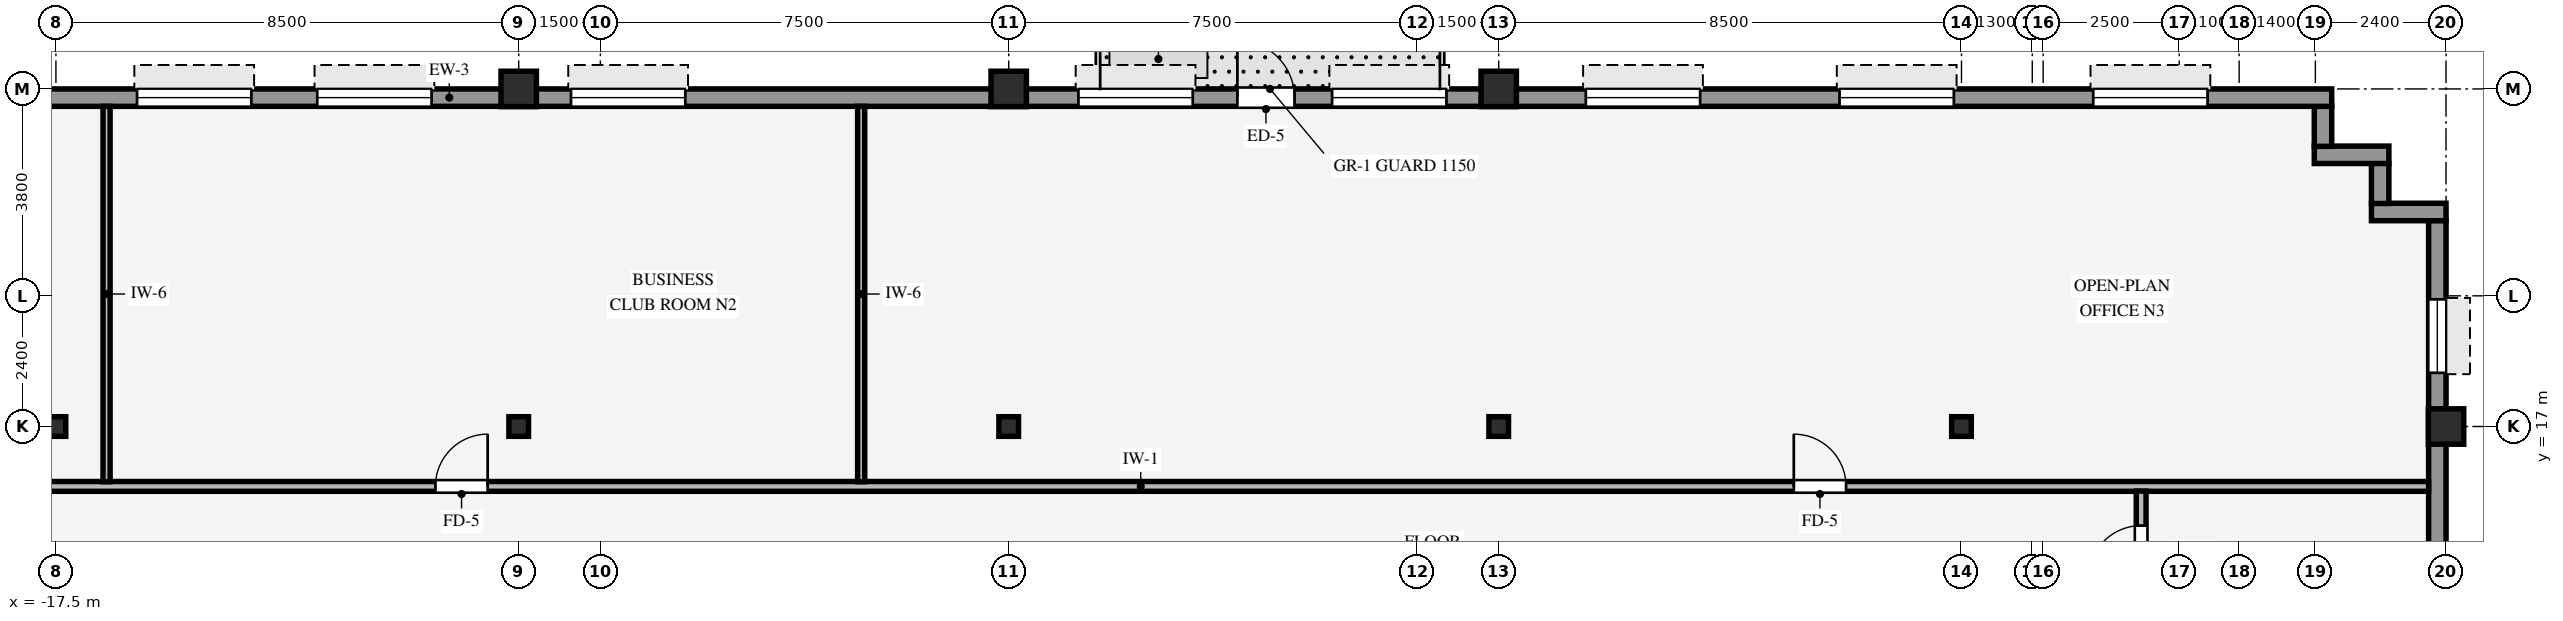
"""IFC4 building model, lengths in metres.
Left out: names, types, materials, properties, quantities, classifications, styles, units other than length and angle.
Written with IfcOpenShell. Run it as: python <this file> out.ifc"""

import sys

from ifc_helpers import new_model, si_unit, direction, frame, frame_2d, origin, origin_2d, place, context, subcontext, project, spatial, rectangle, hollow_rectangle, i_section, extrude, source, transform, mapped, element, fill, save


model = new_model("IFC4")
c1 = context("Model", 3, precision=1e-05, world=origin(), true_north=direction((0.0, 1.0)))
c2 = subcontext(c1, "Body", "Model", "MODEL_VIEW")
j1 = project(units=[si_unit("LENGTHUNIT", "METRE"), si_unit("PLANEANGLEUNIT", "RADIAN")], contexts=[c1])
p1 = place(None, origin())
s1 = spatial("IfcSite", under=j1, at=p1, CompositionType="ELEMENT")
p2 = place(p1, origin())
s2 = spatial("IfcBuilding", under=s1, at=p2, CompositionType="ELEMENT")
p3 = place(p2, frame((0.0, 0.0, 142.1)))
s3 = spatial("IfcBuildingStorey", under=s2, at=p3, CompositionType="ELEMENT", Elevation=142.1)
for number, where, z_axis, x_axis in (
    (1, (26.4, 17.0, 0.0), (0.0, 0.0, 1.0), (1.0, 0.0, 0.0)),
    (2, (-9.0, 23.2, 0.0), (0.0, 0.0, 1.0), (1.0, 0.0, 0.0)),
    (3, (0.0, 23.2, 0.0), (0.0, 0.0, 1.0), (1.0, 0.0, 0.0)),
    (4, (9.0, 23.2, 0.0), (0.0, 0.0, 1.0), (1.0, 0.0, 0.0)),
):
    element("IfcColumn", number, at=place(p3, frame(where, z_axis=z_axis, x_axis=x_axis)), inside=s3, PredefinedType="COLUMN", context=c2, shape_type="SweptSolid", body=[
        extrude(hollow_rectangle(XDim=0.65, YDim=0.65, WallThickness=0.04, InnerFilletRadius=0.04, OuterFilletRadius=0.08, at=origin_2d()), origin(), (0.0, 0.0, 1.0), 3.37),
    ])
for number, where, z_axis, x_axis in (
    (5, (0.0, 17.0, 0.0), (0.0, 0.0, 1.0), (1.0, 0.0, 0.0)),
    (6, (-17.5, 17.0, 0.0), (0.0, 0.0, 1.0), (1.0, 0.0, 0.0)),
    (7, (-9.0, 17.0, 0.0), (0.0, 0.0, 1.0), (1.0, 0.0, 0.0)),
    (8, (9.0, 17.0, 0.0), (0.0, 0.0, 1.0), (1.0, 0.0, 0.0)),
    (9, (17.5, 17.0, 0.0), (0.0, 0.0, 1.0), (1.0, 0.0, 0.0)),
):
    element("IfcColumn", number, at=place(p3, frame(where, z_axis=z_axis, x_axis=x_axis)), inside=s3, PredefinedType="COLUMN", context=c2, shape_type="SweptSolid", body=[
        extrude(i_section(OverallWidth=0.36, OverallDepth=0.36, WebThickness=0.021, FlangeThickness=0.021, FilletRadius=0.018, at=origin_2d()), origin(), (0.0, 0.0, 1.0), 3.37),
    ])
p4 = place(p3, frame((26.24, -20.784, 0.0), z_axis=(0.0, 0.0, 1.0), x_axis=(0.0, 1.0, 0.0)))
e10 = element("IfcWall", 10, at=p4, inside=s3, PredefinedType="STANDARD", context=c2, shape_type="SweptSolid", body=[
    extrude(rectangle(XDim=41.568, YDim=0.32, at=frame_2d((20.784, 0.0))), origin(), (0.0, 0.0, 1.0), 2.705),
])
p5 = place(p4, frame((1.448, 0.0, 0.8)))
e11 = element("IfcOpeningElement", 11, at=p5, cuts=e10, PredefinedType="OPENING", context=c2, shape_type="SweptSolid", body=[
    extrude(rectangle(XDim=1.35, YDim=1.56, at=frame_2d((0.675, 0.78))), frame((0.0, 0.17, 0.0), z_axis=(0.0, -1.0, 0.0), x_axis=(1.0, 0.0, 0.0)), (0.0, 0.0, 1.0), 0.34),
])
p6 = place(p4, frame((7.744, 0.0, 0.8)))
e12 = element("IfcOpeningElement", 12, at=p6, cuts=e10, PredefinedType="OPENING", context=c2, shape_type="SweptSolid", body=[
    extrude(rectangle(XDim=1.35, YDim=1.56, at=frame_2d((0.675, 0.78))), frame((0.0, 0.17, 0.0), z_axis=(0.0, -1.0, 0.0), x_axis=(1.0, 0.0, 0.0)), (0.0, 0.0, 1.0), 0.34),
])
p7 = place(p4, frame((12.69, 0.0, 0.8)))
e13 = element("IfcOpeningElement", 13, at=p7, cuts=e10, PredefinedType="OPENING", context=c2, shape_type="SweptSolid", body=[
    extrude(rectangle(XDim=1.35, YDim=1.56, at=frame_2d((0.675, 0.78))), frame((0.0, 0.17, 0.0), z_axis=(0.0, -1.0, 0.0), x_axis=(1.0, 0.0, 0.0)), (0.0, 0.0, 1.0), 0.34),
])
p8 = place(p4, frame((17.636, 0.0, 0.8)))
e14 = element("IfcOpeningElement", 14, at=p8, cuts=e10, PredefinedType="OPENING", context=c2, shape_type="SweptSolid", body=[
    extrude(rectangle(XDim=1.35, YDim=1.56, at=frame_2d((0.675, 0.78))), frame((0.0, 0.17, 0.0), z_axis=(0.0, -1.0, 0.0), x_axis=(1.0, 0.0, 0.0)), (0.0, 0.0, 1.0), 0.34),
])
p9 = place(p4, frame((22.582, 0.0, 0.8)))
e15 = element("IfcOpeningElement", 15, at=p9, cuts=e10, PredefinedType="OPENING", context=c2, shape_type="SweptSolid", body=[
    extrude(rectangle(XDim=1.35, YDim=1.56, at=frame_2d((0.675, 0.78))), frame((0.0, 0.17, 0.0), z_axis=(0.0, -1.0, 0.0), x_axis=(1.0, 0.0, 0.0)), (0.0, 0.0, 1.0), 0.34),
])
p10 = place(p4, frame((27.528, 0.0, 0.8)))
e16 = element("IfcOpeningElement", 16, at=p10, cuts=e10, PredefinedType="OPENING", context=c2, shape_type="SweptSolid", body=[
    extrude(rectangle(XDim=1.35, YDim=1.56, at=frame_2d((0.675, 0.78))), frame((0.0, 0.17, 0.0), z_axis=(0.0, -1.0, 0.0), x_axis=(1.0, 0.0, 0.0)), (0.0, 0.0, 1.0), 0.34),
])
p11 = place(p4, frame((32.474, 0.0, 0.8)))
e17 = element("IfcOpeningElement", 17, at=p11, cuts=e10, PredefinedType="OPENING", context=c2, shape_type="SweptSolid", body=[
    extrude(rectangle(XDim=1.35, YDim=1.56, at=frame_2d((0.675, 0.78))), frame((0.0, 0.17, 0.0), z_axis=(0.0, -1.0, 0.0), x_axis=(1.0, 0.0, 0.0)), (0.0, 0.0, 1.0), 0.34),
])
p12 = place(p4, frame((38.77, 0.0, 0.8)))
e18 = element("IfcOpeningElement", 18, at=p12, cuts=e10, PredefinedType="OPENING", context=c2, shape_type="SweptSolid", body=[
    extrude(rectangle(XDim=1.35, YDim=1.56, at=frame_2d((0.675, 0.78))), frame((0.0, 0.17, 0.0), z_axis=(0.0, -1.0, 0.0), x_axis=(1.0, 0.0, 0.0)), (0.0, 0.0, 1.0), 0.34),
])
p13 = place(p3, frame((25.03, 20.94, 0.0), z_axis=(0.0, 0.0, 1.0), x_axis=(1.0, 0.0, 0.0)))
e19 = element("IfcWall", 19, at=p13, inside=s3, PredefinedType="STANDARD", context=c2, shape_type="SweptSolid", body=[
    extrude(rectangle(XDim=1.37, YDim=0.32, at=frame_2d((0.685, 0.0))), origin(), (0.0, 0.0, 1.0), 3.36),
])
p14 = place(p3, frame((25.19, 21.096, 0.0), z_axis=(0.0, 0.0, 1.0), x_axis=(0.0, 1.0, 0.0)))
e20 = element("IfcWall", 20, at=p14, inside=s3, PredefinedType="STANDARD", context=c2, shape_type="SweptSolid", body=[
    extrude(rectangle(XDim=0.738, YDim=0.32, at=frame_2d((0.369, 0.0))), origin(), (0.0, 0.0, 1.0), 3.36),
])
p15 = place(p3, frame((23.98, 21.99, 0.0), z_axis=(0.0, 0.0, 1.0), x_axis=(1.0, 0.0, 0.0)))
e21 = element("IfcWall", 21, at=p15, inside=s3, PredefinedType="STANDARD", context=c2, shape_type="SweptSolid", body=[
    extrude(rectangle(XDim=1.37, YDim=0.32, at=frame_2d((0.685, 0.0))), origin(), (0.0, 0.0, 1.0), 3.36),
])
p16 = place(p3, frame((24.14, 22.146, 0.0), z_axis=(0.0, 0.0, 1.0), x_axis=(0.0, 1.0, 0.0)))
e22 = element("IfcWall", 22, at=p16, inside=s3, PredefinedType="STANDARD", context=c2, shape_type="SweptSolid", body=[
    extrude(rectangle(XDim=0.738, YDim=0.32, at=frame_2d((0.369, 0.0))), origin(), (0.0, 0.0, 1.0), 3.36),
])
p17 = place(p3, frame((-24.3, 23.04, 0.0), z_axis=(0.0, 0.0, 1.0), x_axis=(1.0, 0.0, 0.0)))
e23 = element("IfcWall", 23, at=p17, inside=s3, PredefinedType="STANDARD", context=c2, shape_type="SweptSolid", body=[
    extrude(rectangle(XDim=48.6, YDim=0.32, at=frame_2d((24.3, 0.0))), origin(), (0.0, 0.0, 1.0), 2.705),
])
p18 = place(p17, frame((28.5, 0.0, 0.0)))
e24 = element("IfcOpeningElement", 24, at=p18, cuts=e23, PredefinedType="OPENING", context=c2, shape_type="SweptSolid", body=[
    extrude(rectangle(XDim=1.05, YDim=2.1, at=frame_2d((0.525, 1.05))), frame((0.0, 0.17, 0.0), z_axis=(0.0, -1.0, 0.0), x_axis=(1.0, 0.0, 0.0)), (0.0, 0.0, 1.0), 0.34),
])
p19 = place(p17, frame((2.28, 0.0, 0.8)))
e25 = element("IfcOpeningElement", 25, at=p19, cuts=e23, PredefinedType="OPENING", context=c2, shape_type="SweptSolid", body=[
    extrude(rectangle(XDim=2.1, YDim=1.56, at=frame_2d((1.05, 0.78))), frame((0.0, 0.17, 0.0), z_axis=(0.0, -1.0, 0.0), x_axis=(1.0, 0.0, 0.0)), (0.0, 0.0, 1.0), 0.34),
])
p20 = place(p17, frame((8.29, 0.0, 0.8)))
e26 = element("IfcOpeningElement", 26, at=p20, cuts=e23, PredefinedType="OPENING", context=c2, shape_type="SweptSolid", body=[
    extrude(rectangle(XDim=2.1, YDim=1.56, at=frame_2d((1.05, 0.78))), frame((0.0, 0.17, 0.0), z_axis=(0.0, -1.0, 0.0), x_axis=(1.0, 0.0, 0.0)), (0.0, 0.0, 1.0), 0.34),
])
p21 = place(p17, frame((11.6, 0.0, 0.8)))
e27 = element("IfcOpeningElement", 27, at=p21, cuts=e23, PredefinedType="OPENING", context=c2, shape_type="SweptSolid", body=[
    extrude(rectangle(XDim=2.1, YDim=1.56, at=frame_2d((1.05, 0.78))), frame((0.0, 0.17, 0.0), z_axis=(0.0, -1.0, 0.0), x_axis=(1.0, 0.0, 0.0)), (0.0, 0.0, 1.0), 0.34),
])
p22 = place(p17, frame((16.26, 0.0, 0.8)))
e28 = element("IfcOpeningElement", 28, at=p22, cuts=e23, PredefinedType="OPENING", context=c2, shape_type="SweptSolid", body=[
    extrude(rectangle(XDim=2.1, YDim=1.56, at=frame_2d((1.05, 0.78))), frame((0.0, 0.17, 0.0), z_axis=(0.0, -1.0, 0.0), x_axis=(1.0, 0.0, 0.0)), (0.0, 0.0, 1.0), 0.34),
])
p23 = place(p17, frame((25.58, 0.0, 0.8)))
e29 = element("IfcOpeningElement", 29, at=p23, cuts=e23, PredefinedType="OPENING", context=c2, shape_type="SweptSolid", body=[
    extrude(rectangle(XDim=2.1, YDim=1.56, at=frame_2d((1.05, 0.78))), frame((0.0, 0.17, 0.0), z_axis=(0.0, -1.0, 0.0), x_axis=(1.0, 0.0, 0.0)), (0.0, 0.0, 1.0), 0.34),
])
p24 = place(p17, frame((30.24, 0.0, 0.8)))
e30 = element("IfcOpeningElement", 30, at=p24, cuts=e23, PredefinedType="OPENING", context=c2, shape_type="SweptSolid", body=[
    extrude(rectangle(XDim=2.1, YDim=1.56, at=frame_2d((1.05, 0.78))), frame((0.0, 0.17, 0.0), z_axis=(0.0, -1.0, 0.0), x_axis=(1.0, 0.0, 0.0)), (0.0, 0.0, 1.0), 0.34),
])
p25 = place(p17, frame((34.9, 0.0, 0.8)))
e31 = element("IfcOpeningElement", 31, at=p25, cuts=e23, PredefinedType="OPENING", context=c2, shape_type="SweptSolid", body=[
    extrude(rectangle(XDim=2.1, YDim=1.56, at=frame_2d((1.05, 0.78))), frame((0.0, 0.17, 0.0), z_axis=(0.0, -1.0, 0.0), x_axis=(1.0, 0.0, 0.0)), (0.0, 0.0, 1.0), 0.34),
])
p26 = place(p17, frame((39.56, 0.0, 0.8)))
e32 = element("IfcOpeningElement", 32, at=p26, cuts=e23, PredefinedType="OPENING", context=c2, shape_type="SweptSolid", body=[
    extrude(rectangle(XDim=2.1, YDim=1.56, at=frame_2d((1.05, 0.78))), frame((0.0, 0.17, 0.0), z_axis=(0.0, -1.0, 0.0), x_axis=(1.0, 0.0, 0.0)), (0.0, 0.0, 1.0), 0.34),
])
p27 = place(p17, frame((44.22, 0.0, 0.8)))
e33 = element("IfcOpeningElement", 33, at=p27, cuts=e23, PredefinedType="OPENING", context=c2, shape_type="SweptSolid", body=[
    extrude(rectangle(XDim=2.1, YDim=1.56, at=frame_2d((1.05, 0.78))), frame((0.0, 0.17, 0.0), z_axis=(0.0, -1.0, 0.0), x_axis=(1.0, 0.0, 0.0)), (0.0, 0.0, 1.0), 0.34),
])
p28 = place(p3, frame((-26.08, 15.9, 0.0), z_axis=(0.0, 0.0, 1.0), x_axis=(1.0, 0.0, 0.0)))
e34 = element("IfcWall", 34, at=p28, inside=s3, PredefinedType="PARTITIONING", context=c2, shape_type="SweptSolid", body=[
    extrude(rectangle(XDim=52.16, YDim=0.18, at=frame_2d((26.08, 0.0))), origin(), (0.0, 0.0, 1.0), 3.36),
])
p29 = place(p28, frame((15.55, 0.0, 0.0)))
e35 = element("IfcOpeningElement", 35, at=p29, cuts=e34, PredefinedType="OPENING", context=c2, shape_type="SweptSolid", body=[
    extrude(rectangle(XDim=0.96, YDim=2.1, at=frame_2d((0.48, 1.05))), frame((0.0, 0.1, 0.0), z_axis=(0.0, -1.0, 0.0), x_axis=(1.0, 0.0, 0.0)), (0.0, 0.0, 1.0), 0.2),
])
p30 = place(p28, frame((40.5, 0.0, 0.0)))
e36 = element("IfcOpeningElement", 36, at=p30, cuts=e34, PredefinedType="OPENING", context=c2, shape_type="SweptSolid", body=[
    extrude(rectangle(XDim=0.96, YDim=2.1, at=frame_2d((0.48, 1.05))), frame((0.0, 0.1, 0.0), z_axis=(0.0, -1.0, 0.0), x_axis=(1.0, 0.0, 0.0)), (0.0, 0.0, 1.0), 0.2),
])
p31 = place(p28, frame((6.65, 0.0, 0.0)))
e37 = element("IfcOpeningElement", 37, at=p31, cuts=e34, PredefinedType="OPENING", context=c2, shape_type="SweptSolid", body=[
    extrude(rectangle(XDim=0.96, YDim=2.1, at=frame_2d((0.48, 1.05))), frame((0.0, 0.1, 0.0), z_axis=(0.0, -1.0, 0.0), x_axis=(1.0, 0.0, 0.0)), (0.0, 0.0, 1.0), 0.2),
])
for number, where, z_axis, x_axis in (
    (38, (-16.57, 15.986, 0.0), (0.0, 0.0, 1.0), (0.0, 1.0, 0.0)),
    (39, (-2.71, 15.986, 0.0), (0.0, 0.0, 1.0), (0.0, 1.0, 0.0)),
):
    element("IfcWall", number, at=place(p3, frame(where, z_axis=z_axis, x_axis=x_axis)), inside=s3, PredefinedType="PARTITIONING", context=c2, shape_type="SweptSolid", body=[
        extrude(rectangle(XDim=6.894, YDim=0.13, at=frame_2d((3.447, 0.0))), origin(), (0.0, 0.0, 1.0), 3.36),
    ])
p32 = place(p3, frame((20.8, 13.586, 0.0), z_axis=(0.0, 0.0, 1.0), x_axis=(0.0, 1.0, 0.0)))
e40 = element("IfcWall", 40, at=p32, inside=s3, PredefinedType="PARTITIONING", context=c2, shape_type="SweptSolid", body=[
    extrude(rectangle(XDim=2.228, YDim=0.18, at=frame_2d((1.114, 0.0))), origin(), (0.0, 0.0, 1.0), 3.36),
])
p33 = place(p32, frame((0.634, 0.0, 0.0)))
e41 = element("IfcOpeningElement", 41, at=p33, cuts=e40, PredefinedType="OPENING", context=c2, shape_type="SweptSolid", body=[
    extrude(rectangle(XDim=0.96, YDim=2.1, at=frame_2d((0.48, 1.05))), frame((0.0, 0.1, 0.0), z_axis=(0.0, -1.0, 0.0), x_axis=(1.0, 0.0, 0.0)), (0.0, 0.0, 1.0), 0.2),
])
m1 = source(origin(), c2, "Body", "SweptSolid", [
    extrude(rectangle(XDim=1.35, YDim=1.56, at=frame_2d((0.675, 0.78))), frame((0.0, 0.03, 0.0), z_axis=(0.0, -1.0, 0.0), x_axis=(1.0, 0.0, 0.0)), (0.0, 0.0, 1.0), 0.06),
])
p34 = place(p12, origin())
e42 = element("IfcWindow", 42, at=p34, inside=s3, PartitioningType="SINGLE_PANEL", PredefinedType="WINDOW", context=c2, shape_type="MappedRepresentation", body=[
    mapped(m1, transform((0.0, 0.0, 0.0), scale=1.0)),
])
fill(e18, e42)
m2 = source(origin(), c2, "Body", "SweptSolid", [
    extrude(rectangle(XDim=1.05, YDim=2.1, at=frame_2d((0.525, 1.05))), frame((0.0, 0.025, 0.0), z_axis=(0.0, -1.0, 0.0), x_axis=(1.0, 0.0, 0.0)), (0.0, 0.0, 1.0), 0.05),
])
p35 = place(p18, origin())
e43 = element("IfcDoor", 43, at=p35, inside=s3, OperationType="SINGLE_SWING_LEFT", PredefinedType="DOOR", context=c2, shape_type="MappedRepresentation", body=[
    mapped(m2, transform((0.0, 0.0, 0.0), scale=1.0)),
])
fill(e24, e43)
m3 = source(origin(), c2, "Body", "SweptSolid", [
    extrude(rectangle(XDim=2.1, YDim=1.56, at=frame_2d((1.05, 0.78))), frame((0.0, 0.03, 0.0), z_axis=(0.0, -1.0, 0.0), x_axis=(1.0, 0.0, 0.0)), (0.0, 0.0, 1.0), 0.06),
])
p36 = place(p20, origin())
e44 = element("IfcWindow", 44, at=p36, inside=s3, PartitioningType="SINGLE_PANEL", PredefinedType="WINDOW", context=c2, shape_type="MappedRepresentation", body=[
    mapped(m3, transform((0.0, 0.0, 0.0), scale=1.0)),
])
fill(e26, e44)
p37 = place(p21, origin())
e45 = element("IfcWindow", 45, at=p37, inside=s3, PartitioningType="SINGLE_PANEL", PredefinedType="WINDOW", context=c2, shape_type="MappedRepresentation", body=[
    mapped(m3, transform((0.0, 0.0, 0.0), scale=1.0)),
])
fill(e27, e45)
p38 = place(p22, origin())
e46 = element("IfcWindow", 46, at=p38, inside=s3, PartitioningType="SINGLE_PANEL", PredefinedType="WINDOW", context=c2, shape_type="MappedRepresentation", body=[
    mapped(m3, transform((0.0, 0.0, 0.0), scale=1.0)),
])
fill(e28, e46)
p39 = place(p23, origin())
e47 = element("IfcWindow", 47, at=p39, inside=s3, PartitioningType="SINGLE_PANEL", PredefinedType="WINDOW", context=c2, shape_type="MappedRepresentation", body=[
    mapped(m3, transform((0.0, 0.0, 0.0), scale=1.0)),
])
fill(e29, e47)
p40 = place(p24, origin())
e48 = element("IfcWindow", 48, at=p40, inside=s3, PartitioningType="SINGLE_PANEL", PredefinedType="WINDOW", context=c2, shape_type="MappedRepresentation", body=[
    mapped(m3, transform((0.0, 0.0, 0.0), scale=1.0)),
])
fill(e30, e48)
p41 = place(p25, origin())
e49 = element("IfcWindow", 49, at=p41, inside=s3, PartitioningType="SINGLE_PANEL", PredefinedType="WINDOW", context=c2, shape_type="MappedRepresentation", body=[
    mapped(m3, transform((0.0, 0.0, 0.0), scale=1.0)),
])
fill(e31, e49)
p42 = place(p26, origin())
e50 = element("IfcWindow", 50, at=p42, inside=s3, PartitioningType="SINGLE_PANEL", PredefinedType="WINDOW", context=c2, shape_type="MappedRepresentation", body=[
    mapped(m3, transform((0.0, 0.0, 0.0), scale=1.0)),
])
fill(e32, e50)
p43 = place(p27, origin())
e51 = element("IfcWindow", 51, at=p43, inside=s3, PartitioningType="SINGLE_PANEL", PredefinedType="WINDOW", context=c2, shape_type="MappedRepresentation", body=[
    mapped(m3, transform((0.0, 0.0, 0.0), scale=1.0)),
])
fill(e33, e51)
m4 = source(origin(), c2, "Body", "SweptSolid", [
    extrude(rectangle(XDim=0.96, YDim=2.1, at=frame_2d((0.48, 1.05))), frame((0.0, 0.025, 0.0), z_axis=(0.0, -1.0, 0.0), x_axis=(1.0, 0.0, 0.0)), (0.0, 0.0, 1.0), 0.05),
])
p44 = place(p29, origin())
e52 = element("IfcDoor", 52, at=p44, inside=s3, OperationType="SINGLE_SWING_RIGHT", PredefinedType="DOOR", context=c2, shape_type="MappedRepresentation", body=[
    mapped(m4, transform((0.0, 0.0, 0.0), scale=1.0)),
])
fill(e35, e52)
p45 = place(p30, origin())
e53 = element("IfcDoor", 53, at=p45, inside=s3, OperationType="SINGLE_SWING_LEFT", PredefinedType="DOOR", context=c2, shape_type="MappedRepresentation", body=[
    mapped(m4, transform((0.0, 0.0, 0.0), scale=1.0)),
])
fill(e36, e53)
p46 = place(p33, origin())
e54 = element("IfcDoor", 54, at=p46, inside=s3, OperationType="SINGLE_SWING_LEFT", PredefinedType="DOOR", context=c2, shape_type="MappedRepresentation", body=[
    mapped(m4, transform((0.0, 0.0, 0.0), scale=1.0)),
])
fill(e41, e54)
save(model, sys.argv[1])
